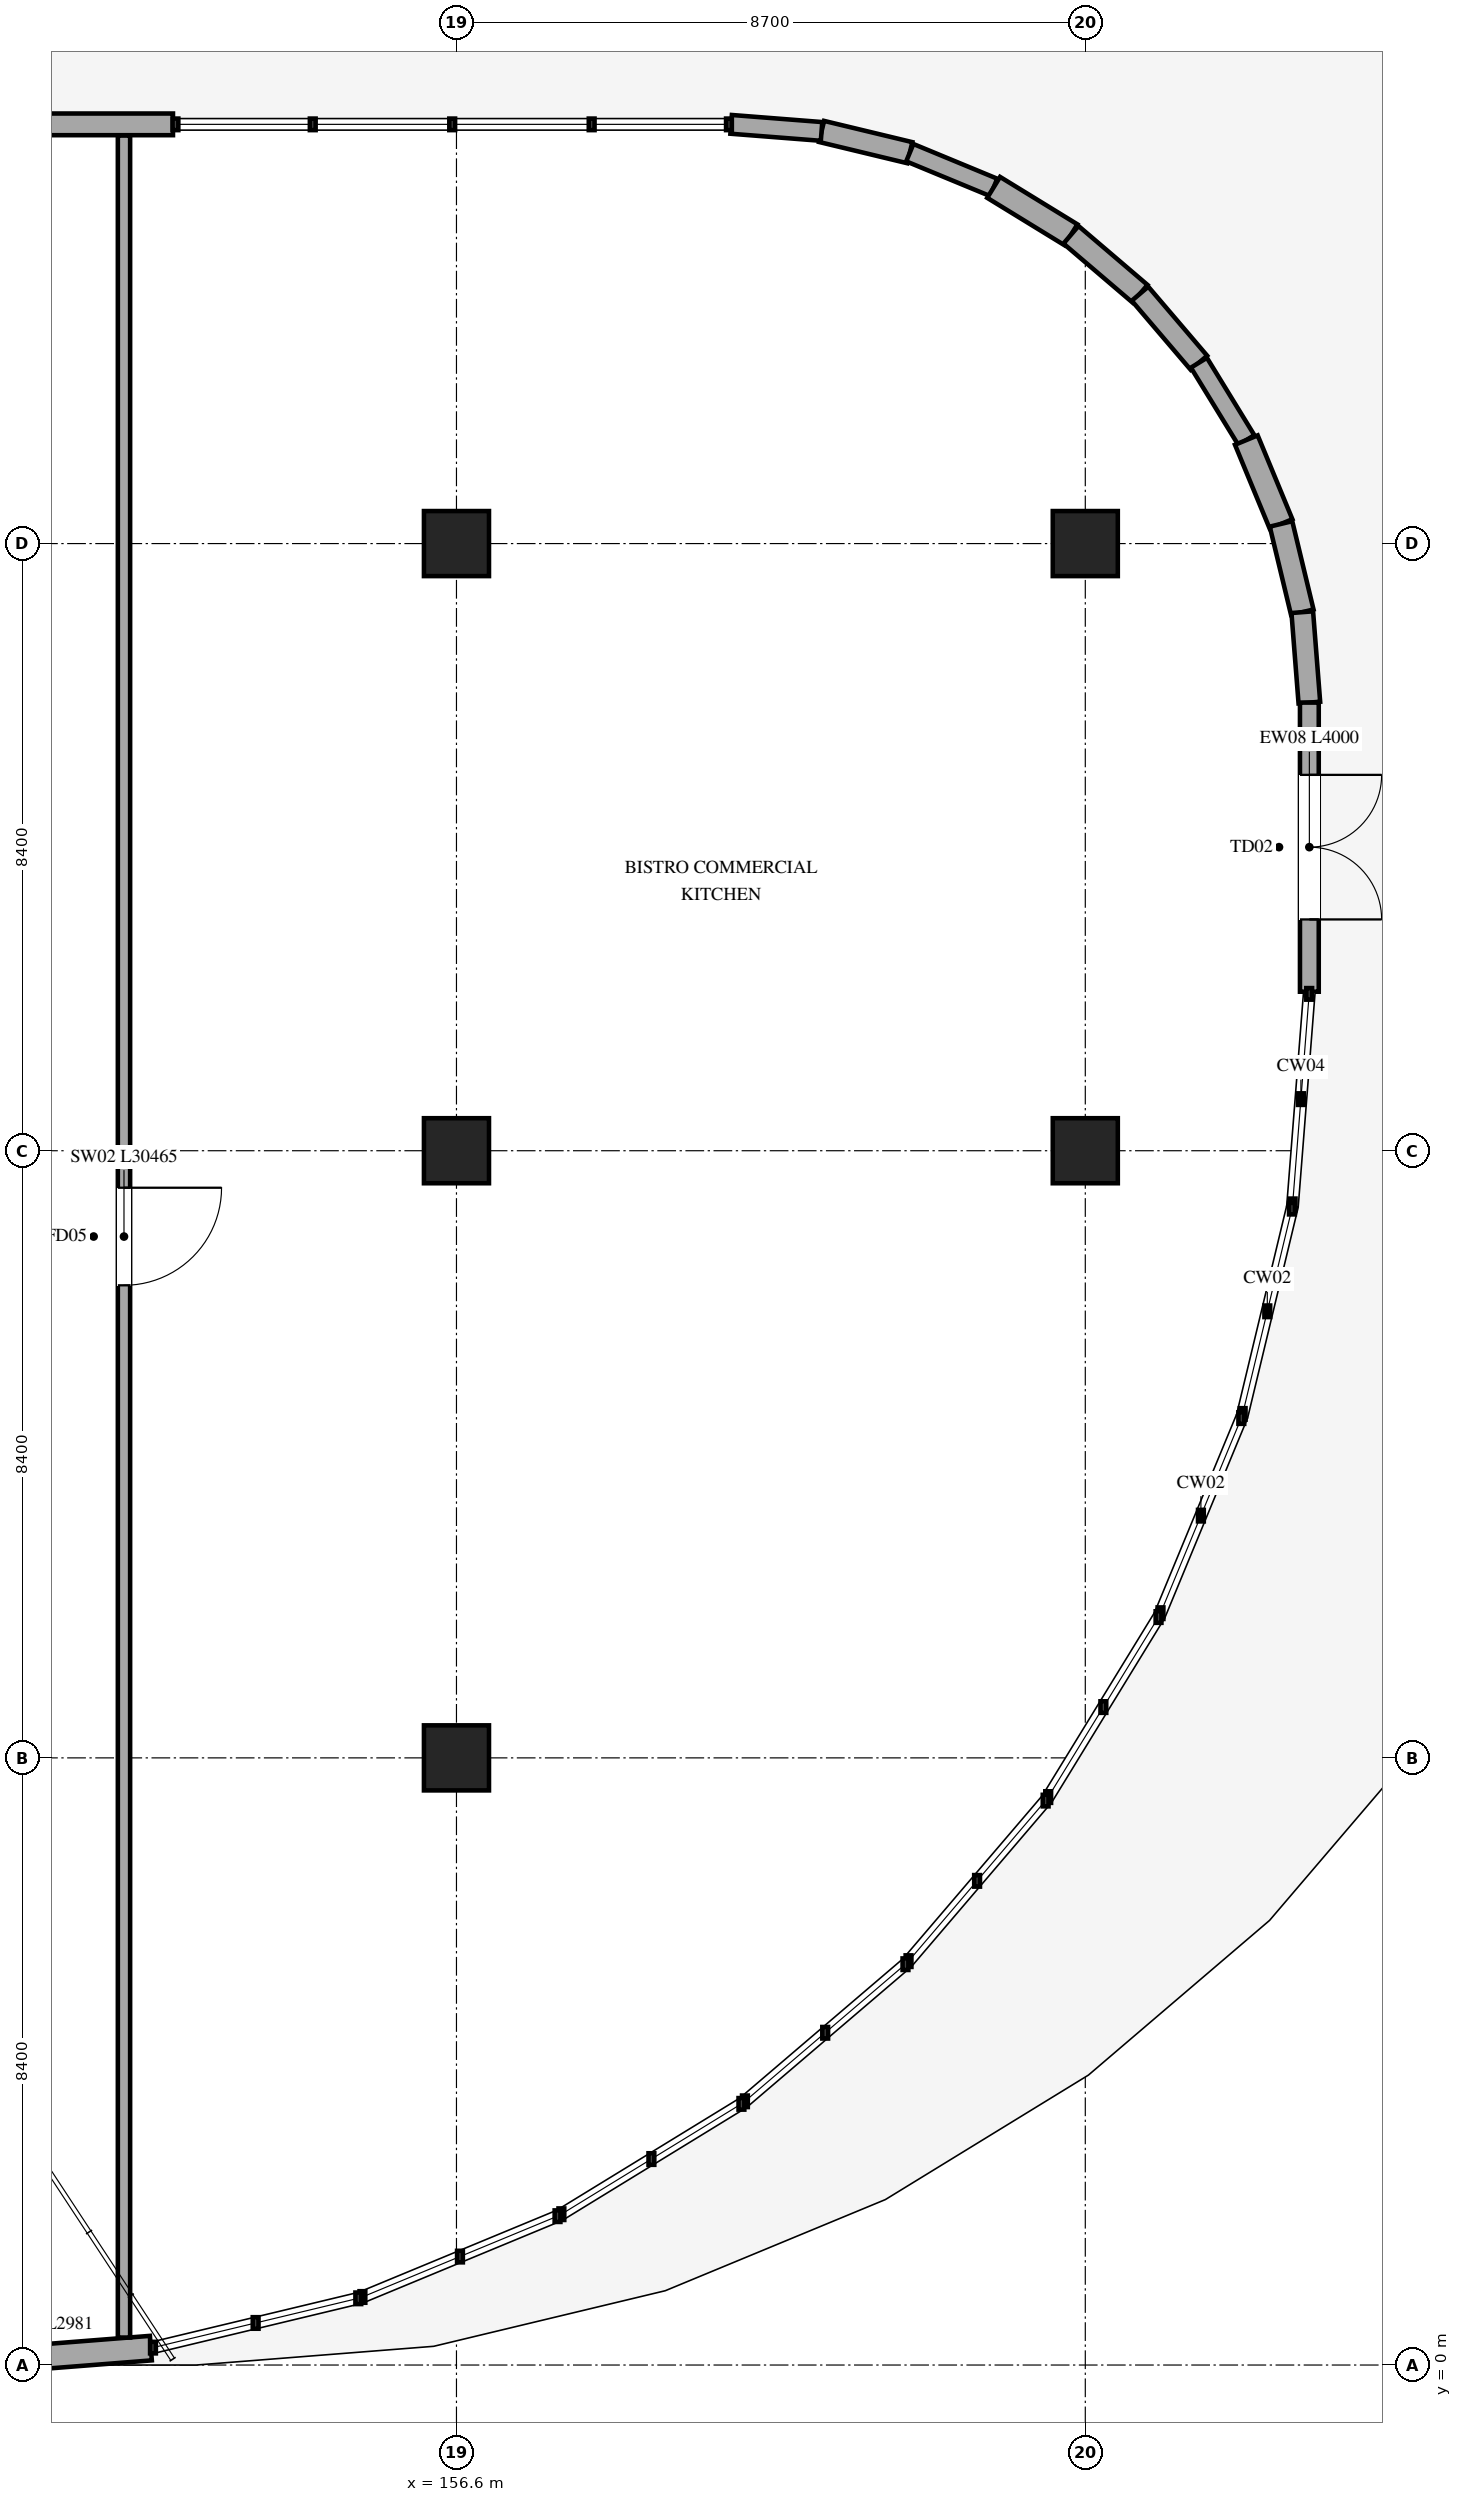
"""IFC4 building model, lengths in metres.
Left out: names, types, materials, properties, quantities, classifications, styles, units other than length and angle.
Written with IfcOpenShell. Run it as: python <this file> out.ifc"""

import sys

from ifc_helpers import new_model, si_unit, direction, frame, frame_2d, origin, origin_2d, place, context, subcontext, project, spatial, rectangle, extrude, element, fill, save


model = new_model("IFC4")
c1 = context("Model", 3, precision=1e-05, world=origin(), true_north=direction((0.0, 1.0)))
c2 = subcontext(c1, "Body", "Model", "MODEL_VIEW")
j1 = project(units=[si_unit("LENGTHUNIT", "METRE"), si_unit("PLANEANGLEUNIT", "RADIAN")], contexts=[c1])
p1 = place(None, origin())
s1 = spatial("IfcSite", under=j1, at=p1, CompositionType="ELEMENT")
p2 = place(p1, origin())
s2 = spatial("IfcBuilding", under=s1, at=p2, CompositionType="ELEMENT")
p3 = place(p2, frame((0.0, 0.0, 11.4)))
s3 = spatial("IfcBuildingStorey", under=s2, at=p3, CompositionType="ELEMENT", Elevation=11.4)
for number, where, z_axis, x_axis in (
    (1, (156.6, 8.4, 0.0), (0.0, 0.0, 1.0), (1.0, 0.0, 0.0)),
    (2, (156.6, 16.8, 0.0), (0.0, 0.0, 1.0), (1.0, 0.0, 0.0)),
    (3, (156.6, 25.2, 0.0), (0.0, 0.0, 1.0), (1.0, 0.0, 0.0)),
    (4, (165.3, 16.8, 0.0), (0.0, 0.0, 1.0), (1.0, 0.0, 0.0)),
    (5, (165.3, 25.2, 0.0), (0.0, 0.0, 1.0), (1.0, 0.0, 0.0)),
):
    element("IfcColumn", number, at=place(p3, frame(where, z_axis=z_axis, x_axis=x_axis)), inside=s3, PredefinedType="COLUMN", context=c2, shape_type="SweptSolid", body=[
        extrude(rectangle(XDim=0.9, YDim=0.9, at=origin_2d()), origin(), (0.0, 0.0, 1.0), 5.1),
    ])
p4 = place(p3, frame((161.651, 30.902, 0.0), z_axis=(0.0, 0.0, 1.0), x_axis=(0.972187588749, -0.234203527477, 0.0)))
e6 = element("IfcWall", 6, at=p4, inside=s3, PredefinedType="STANDARD", context=c2, shape_type="SweptSolid", body=[
    extrude(rectangle(XDim=1.256, YDim=0.3, at=frame_2d((0.628, 0.0))), origin(), (0.0, 0.0, 1.0), 4.79),
])
p5 = place(p3, frame((162.872, 30.608, 0.0), z_axis=(0.0, 0.0, 1.0), x_axis=(0.924012093559, -0.382363244777, 0.0)))
e7 = element("IfcWall", 7, at=p5, inside=s3, PredefinedType="STANDARD", context=c2, shape_type="SweptSolid", body=[
    extrude(rectangle(XDim=1.255, YDim=0.26, at=frame_2d((0.628, 0.0))), origin(), (0.0, 0.0, 1.0), 4.79),
])
p6 = place(p3, frame((164.032, 30.128, 0.0), z_axis=(0.0, 0.0, 1.0), x_axis=(0.852545336416, -0.522653278337, 0.0)))
e8 = element("IfcWall", 8, at=p6, inside=s3, PredefinedType="STANDARD", context=c2, shape_type="SweptSolid", body=[
    extrude(rectangle(XDim=1.255, YDim=0.34, at=frame_2d((0.627, 0.0))), origin(), (0.0, 0.0, 1.0), 4.79),
])
p7 = place(p3, frame((165.102, 29.472, 0.0), z_axis=(0.0, 0.0, 1.0), x_axis=(0.76062774277, -0.649188290812, 0.0)))
e9 = element("IfcWall", 9, at=p7, inside=s3, PredefinedType="STANDARD", context=c2, shape_type="SweptSolid", body=[
    extrude(rectangle(XDim=1.255, YDim=0.32, at=frame_2d((0.628, 0.0))), origin(), (0.0, 0.0, 1.0), 4.79),
])
p8 = place(p3, frame((166.057, 28.657, 0.0), z_axis=(0.0, 0.0, 1.0), x_axis=(0.649204771389, -0.760613676452, 0.0)))
e10 = element("IfcWall", 10, at=p8, inside=s3, PredefinedType="STANDARD", context=c2, shape_type="SweptSolid", body=[
    extrude(rectangle(XDim=1.256, YDim=0.3, at=frame_2d((0.628, 0.0))), origin(), (0.0, 0.0, 1.0), 4.79),
])
p9 = place(p3, frame((166.872, 27.702, 0.0), z_axis=(0.0, 0.0, 1.0), x_axis=(0.522739961681, -0.852492189091, 0.0)))
e11 = element("IfcWall", 11, at=p9, inside=s3, PredefinedType="STANDARD", context=c2, shape_type="SweptSolid", body=[
    extrude(rectangle(XDim=1.255, YDim=0.26, at=frame_2d((0.627, 0.0))), origin(), (0.0, 0.0, 1.0), 4.79),
])
p10 = place(p3, frame((167.528, 26.632, 0.0), z_axis=(0.0, 0.0, 1.0), x_axis=(0.382294541879, -0.92404052035, 0.0)))
e12 = element("IfcWall", 12, at=p10, inside=s3, PredefinedType="STANDARD", context=c2, shape_type="SweptSolid", body=[
    extrude(rectangle(XDim=1.256, YDim=0.34, at=frame_2d((0.628, 0.0))), origin(), (0.0, 0.0, 1.0), 4.79),
])
p11 = place(p3, frame((168.008, 25.472, 0.0), z_axis=(0.0, 0.0, 1.0), x_axis=(0.234064047206, -0.972221179468, 0.0)))
e13 = element("IfcWall", 13, at=p11, inside=s3, PredefinedType="STANDARD", context=c2, shape_type="SweptSolid", body=[
    extrude(rectangle(XDim=1.256, YDim=0.32, at=frame_2d((0.628, 0.0))), origin(), (0.0, 0.0, 1.0), 4.79),
])
p12 = place(p3, frame((168.302, 24.251, 0.0), z_axis=(0.0, 0.0, 1.0), x_axis=(0.078020618655, -0.996951745605, 0.0)))
e14 = element("IfcWall", 14, at=p12, inside=s3, PredefinedType="STANDARD", context=c2, shape_type="SweptSolid", body=[
    extrude(rectangle(XDim=1.255, YDim=0.3, at=frame_2d((0.627, 0.0))), origin(), (0.0, 0.0, 1.0), 4.79),
])
p13 = place(p3, frame((168.4, 23.0, 0.0), z_axis=(0.0, 0.0, 1.0), x_axis=(0.0, -1.0, 0.0)))
e15 = element("IfcWall", 15, at=p13, inside=s3, PredefinedType="STANDARD", context=c2, shape_type="SweptSolid", body=[
    extrude(rectangle(XDim=4.0, YDim=0.26, at=frame_2d((2.0, 0.0))), origin(), (0.0, 0.0, 1.0), 4.79),
])
p14 = place(p13, frame((1.0, 0.0, 0.0)))
e16 = element("IfcOpeningElement", 16, at=p14, cuts=e15, PredefinedType="OPENING", context=c2, shape_type="SweptSolid", body=[
    extrude(rectangle(XDim=2.0, YDim=2.25, at=frame_2d((1.0, 1.125))), frame((0.0, 0.14, 0.0), z_axis=(0.0, -1.0, 0.0), x_axis=(1.0, 0.0, 0.0)), (0.0, 0.0, 1.0), 0.28),
])
p15 = place(p3, frame((152.372, 0.234, 0.0), z_axis=(0.0, 0.0, 1.0), x_axis=(-0.996918067583, -0.07844977072, 0.0)))
e17 = element("IfcWall", 17, at=p15, inside=s3, PredefinedType="STANDARD", context=c2, shape_type="SweptSolid", body=[
    extrude(rectangle(XDim=2.981, YDim=0.34, at=frame_2d((1.491, 0.0))), origin(), (0.0, 0.0, 1.0), 4.79),
])
p16 = place(p3, frame((144.962, 31.0, 0.0), z_axis=(0.0, 0.0, 1.0), x_axis=(1.0, 0.0, 0.0)))
e18 = element("IfcWall", 18, at=p16, inside=s3, PredefinedType="STANDARD", context=c2, shape_type="SweptSolid", body=[
    extrude(rectangle(XDim=7.716, YDim=0.3, at=frame_2d((3.858, 0.0))), origin(), (0.0, 0.0, 1.0), 4.79),
])
p17 = place(p16, frame((1.878, 0.0, 0.85)))
e19 = element("IfcOpeningElement", 19, at=p17, cuts=e18, PredefinedType="OPENING", context=c2, shape_type="SweptSolid", body=[
    extrude(rectangle(XDim=3.0, YDim=1.7, at=frame_2d((1.5, 0.85))), frame((0.0, 0.16, 0.0), z_axis=(0.0, -1.0, 0.0), x_axis=(1.0, 0.0, 0.0)), (0.0, 0.0, 1.0), 0.32),
])
p18 = place(p3, frame((160.4, 31.0, 0.0), z_axis=(0.0, 0.0, 1.0), x_axis=(0.996951745605, -0.078020618655, 0.0)))
e20 = element("IfcWall", 20, at=p18, inside=s3, PredefinedType="STANDARD", context=c2, shape_type="SweptSolid", body=[
    extrude(rectangle(XDim=1.255, YDim=0.26, at=frame_2d((0.627, 0.0))), origin(), (0.0, 0.0, 1.0), 4.79),
])
p19 = place(p3, frame((152.0, 30.845, 0.0), z_axis=(0.0, 0.0, 1.0), x_axis=(0.0, -1.0, 0.0)))
e21 = element("IfcWall", 21, at=p19, inside=s3, PredefinedType="MOVABLE", context=c2, shape_type="SweptSolid", body=[
    extrude(rectangle(XDim=30.465, YDim=0.17, at=frame_2d((15.232, 0.0))), origin(), (0.0, 0.0, 1.0), 4.045),
])
p20 = place(p19, frame((14.557, 0.0, 0.0)))
e22 = element("IfcOpeningElement", 22, at=p20, cuts=e21, PredefinedType="OPENING", context=c2, shape_type="SweptSolid", body=[
    extrude(rectangle(XDim=1.35, YDim=2.2, at=frame_2d((0.675, 1.1))), frame((0.0, 0.095, 0.0), z_axis=(0.0, -1.0, 0.0), x_axis=(1.0, 0.0, 0.0)), (0.0, 0.0, 1.0), 0.19),
])
p21 = place(p14, origin())
e23 = element("IfcDoor", 23, at=p21, inside=s3, OperationType="DOUBLE_DOOR_SINGLE_SWING", PredefinedType="DOOR", context=c2, shape_type="SweptSolid", body=[
    extrude(rectangle(XDim=2.0, YDim=2.25, at=frame_2d((1.0, 1.125))), frame((0.0, 0.025, 0.0), z_axis=(0.0, -1.0, 0.0), x_axis=(1.0, 0.0, 0.0)), (0.0, 0.0, 1.0), 0.05),
])
fill(e16, e23)
p22 = place(p20, origin())
e24 = element("IfcDoor", 24, at=p22, inside=s3, OperationType="SINGLE_SWING_LEFT", PredefinedType="DOOR", context=c2, shape_type="SweptSolid", body=[
    extrude(rectangle(XDim=1.35, YDim=2.2, at=frame_2d((0.675, 1.1))), frame((0.0, 0.025, 0.0), z_axis=(0.0, -1.0, 0.0), x_axis=(1.0, 0.0, 0.0)), (0.0, 0.0, 1.0), 0.05),
])
fill(e22, e24)
save(model, sys.argv[1])
